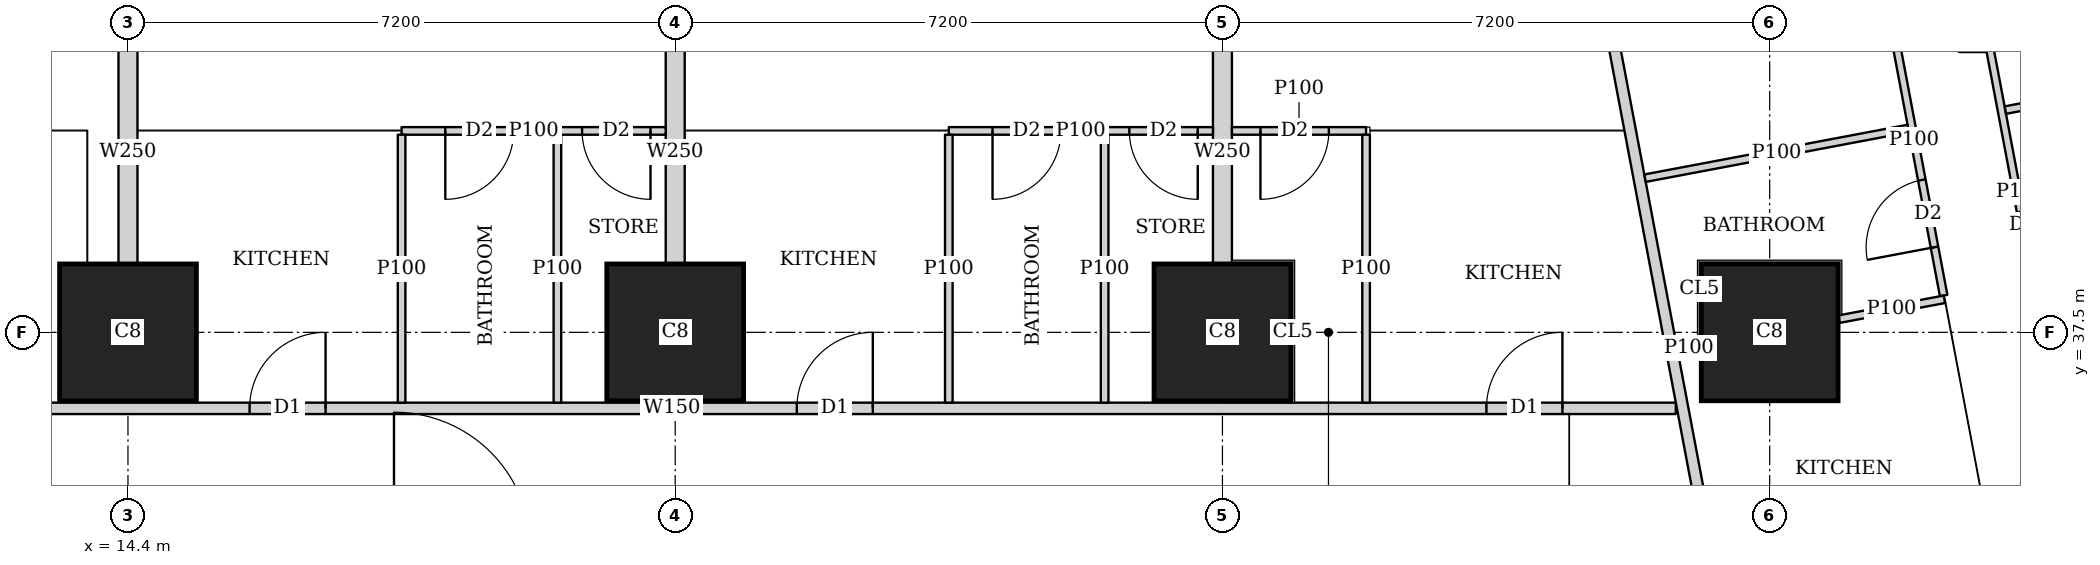
"""IFC4 building model, lengths in metres.
Left out: names, types, materials, properties, quantities, classifications, styles, units other than length and angle.
Written with IfcOpenShell. Run it as: python <this file> out.ifc"""

import sys

from ifc_helpers import new_model, si_unit, direction, frame, frame_2d, origin, origin_2d, place, context, subcontext, project, spatial, rectangle, extrude, element, fill, save


model = new_model("IFC4")
c1 = context("Model", 3, precision=1e-05, world=origin(), true_north=direction((0.0, 1.0)))
c2 = subcontext(c1, "Body", "Model", "MODEL_VIEW")
j1 = project(units=[si_unit("LENGTHUNIT", "METRE"), si_unit("PLANEANGLEUNIT", "RADIAN")], contexts=[c1])
p1 = place(None, origin())
s1 = spatial("IfcSite", under=j1, at=p1, CompositionType="ELEMENT")
p2 = place(p1, origin())
s2 = spatial("IfcBuilding", under=s1, at=p2, CompositionType="ELEMENT")
p3 = place(p2, frame((0.0, 0.0, 42.5)))
s3 = spatial("IfcBuildingStorey", under=s2, at=p3, CompositionType="ELEMENT", Elevation=42.5)
for number, where, z_axis, x_axis in (
    (1, (14.4, 37.5, 0.0), (0.0, 0.0, 1.0), (1.0, 0.0, 0.0)),
    (2, (21.6, 37.5, 0.0), (0.0, 0.0, 1.0), (1.0, 0.0, 0.0)),
    (3, (28.8, 37.5, 0.0), (0.0, 0.0, 1.0), (1.0, 0.0, 0.0)),
    (4, (36.0, 37.5, 0.0), (0.0, 0.0, 1.0), (1.0, 0.0, 0.0)),
):
    element("IfcColumn", number, at=place(p3, frame(where, z_axis=z_axis, x_axis=x_axis)), inside=s3, PredefinedType="COLUMN", context=c2, shape_type="SweptSolid", body=[
        extrude(rectangle(XDim=1.8, YDim=1.8, at=origin_2d()), origin(), (0.0, 0.0, 1.0), 3.75),
    ])
p4 = place(p3, frame((8.35, 36.5, 0.0), z_axis=(0.0, 0.0, 1.0), x_axis=(1.0, 0.0, 0.0)))
e5 = element("IfcWall", 5, at=p4, inside=s3, PredefinedType="SOLIDWALL", context=c2, shape_type="SweptSolid", body=[
    extrude(rectangle(XDim=26.415, YDim=0.15, at=frame_2d((13.208, 0.0))), origin(), (0.0, 0.0, 1.0), 3.5),
])
p5 = place(p4, frame((3.383, 0.0, 0.0)))
e6 = element("IfcOpeningElement", 6, at=p5, cuts=e5, PredefinedType="OPENING", context=c2, shape_type="SweptSolid", body=[
    extrude(rectangle(XDim=1.0, YDim=2.1, at=frame_2d((0.5, 1.05))), frame((0.0, 0.085, 0.0), z_axis=(0.0, -1.0, 0.0), x_axis=(1.0, 0.0, 0.0)), (0.0, 0.0, 1.0), 0.17),
])
p6 = place(p4, frame((7.65, 0.0, 0.0)))
e7 = element("IfcOpeningElement", 7, at=p6, cuts=e5, PredefinedType="OPENING", context=c2, shape_type="SweptSolid", body=[
    extrude(rectangle(XDim=1.0, YDim=2.1, at=frame_2d((0.5, 1.05))), frame((0.0, 0.085, 0.0), z_axis=(0.0, -1.0, 0.0), x_axis=(1.0, 0.0, 0.0)), (0.0, 0.0, 1.0), 0.17),
])
p7 = place(p4, frame((14.85, 0.0, 0.0)))
e8 = element("IfcOpeningElement", 8, at=p7, cuts=e5, PredefinedType="OPENING", context=c2, shape_type="SweptSolid", body=[
    extrude(rectangle(XDim=1.0, YDim=2.1, at=frame_2d((0.5, 1.05))), frame((0.0, 0.085, 0.0), z_axis=(0.0, -1.0, 0.0), x_axis=(1.0, 0.0, 0.0)), (0.0, 0.0, 1.0), 0.17),
])
p8 = place(p4, frame((23.923, 0.0, 0.0)))
e9 = element("IfcOpeningElement", 9, at=p8, cuts=e5, PredefinedType="OPENING", context=c2, shape_type="SweptSolid", body=[
    extrude(rectangle(XDim=1.0, YDim=2.1, at=frame_2d((0.5, 1.05))), frame((0.0, 0.085, 0.0), z_axis=(0.0, -1.0, 0.0), x_axis=(1.0, 0.0, 0.0)), (0.0, 0.0, 1.0), 0.17),
])
p9 = place(p3, frame((33.68, 42.723, 0.0), z_axis=(0.0, 0.0, 1.0), x_axis=(0.185624129307, -0.98262082342, 0.0)))
e10 = element("IfcWall", 10, at=p9, inside=s3, PredefinedType="SOLIDWALL", context=c2, shape_type="SweptSolid", body=[
    extrude(rectangle(XDim=41.051, YDim=0.15, at=frame_2d((20.526, 0.0))), origin(), (0.0, 0.0, 1.0), 2.5),
])
p10 = place(p9, frame((7.73, 0.0, 0.0)))
e11 = element("IfcOpeningElement", 11, at=p10, cuts=e10, PredefinedType="OPENING", context=c2, shape_type="SweptSolid", body=[
    extrude(rectangle(XDim=1.0, YDim=2.1, at=frame_2d((0.5, 1.05))), frame((0.0, 0.085, 0.0), z_axis=(0.0, -1.0, 0.0), x_axis=(1.0, 0.0, 0.0)), (0.0, 0.0, 1.0), 0.17),
])
p11 = place(p9, frame((12.307, 0.0, 0.0)))
e12 = element("IfcOpeningElement", 12, at=p11, cuts=e10, PredefinedType="OPENING", context=c2, shape_type="SweptSolid", body=[
    extrude(rectangle(XDim=1.0, YDim=2.1, at=frame_2d((0.5, 1.05))), frame((0.0, 0.085, 0.0), z_axis=(0.0, -1.0, 0.0), x_axis=(1.0, 0.0, 0.0)), (0.0, 0.0, 1.0), 0.17),
])
p12 = place(p9, frame((19.938, 0.0, 0.0)))
e13 = element("IfcOpeningElement", 13, at=p12, cuts=e10, PredefinedType="OPENING", context=c2, shape_type="SweptSolid", body=[
    extrude(rectangle(XDim=1.0, YDim=2.1, at=frame_2d((0.5, 1.05))), frame((0.0, 0.085, 0.0), z_axis=(0.0, -1.0, 0.0), x_axis=(1.0, 0.0, 0.0)), (0.0, 0.0, 1.0), 0.17),
])
p13 = place(p9, frame((32.193, 0.0, 0.0)))
e14 = element("IfcOpeningElement", 14, at=p13, cuts=e10, PredefinedType="OPENING", context=c2, shape_type="SweptSolid", body=[
    extrude(rectangle(XDim=1.0, YDim=2.1, at=frame_2d((0.5, 1.05))), frame((0.0, 0.085, 0.0), z_axis=(0.0, -1.0, 0.0), x_axis=(1.0, 0.0, 0.0)), (0.0, 0.0, 1.0), 0.17),
])
p14 = place(p3, frame((38.899, 41.22, 0.0), z_axis=(0.0, 0.0, 1.0), x_axis=(0.185517409072, -0.982640977637, 0.0)))
e15 = element("IfcWall", 15, at=p14, inside=s3, PredefinedType="PARTITIONING", context=c2, shape_type="SweptSolid", body=[
    extrude(rectangle(XDim=4.426, YDim=0.1, at=frame_2d((2.213, 0.0))), origin(), (0.0, 0.0, 1.0), 3.5),
])
p15 = place(p14, frame((1.9, 0.0, 0.0)))
e16 = element("IfcOpeningElement", 16, at=p15, cuts=e15, PredefinedType="OPENING", context=c2, shape_type="SweptSolid", body=[
    extrude(rectangle(XDim=0.9, YDim=2.1, at=frame_2d((0.45, 1.05))), frame((0.0, 0.06, 0.0), z_axis=(0.0, -1.0, 0.0), x_axis=(1.0, 0.0, 0.0)), (0.0, 0.0, 1.0), 0.12),
])
p16 = place(p3, frame((37.514, 42.089, 0.0), z_axis=(0.0, 0.0, 1.0), x_axis=(0.185540945282, -0.982636533833, 0.0)))
e17 = element("IfcWall", 17, at=p16, inside=s3, PredefinedType="PARTITIONING", context=c2, shape_type="SweptSolid", body=[
    extrude(rectangle(XDim=4.178, YDim=0.1, at=frame_2d((2.089, 0.0))), origin(), (0.0, 0.0, 1.0), 3.5),
])
p17 = place(p16, frame((2.63, 0.0, 0.0)))
e18 = element("IfcOpeningElement", 18, at=p17, cuts=e17, PredefinedType="OPENING", context=c2, shape_type="SweptSolid", body=[
    extrude(rectangle(XDim=0.9, YDim=2.1, at=frame_2d((0.45, 1.05))), frame((0.0, 0.06, 0.0), z_axis=(0.0, -1.0, 0.0), x_axis=(1.0, 0.0, 0.0)), (0.0, 0.0, 1.0), 0.12),
])
p18 = place(p3, frame((43.277, 41.212, 0.0), z_axis=(0.0, 0.0, 1.0), x_axis=(-0.982665405803, -0.185387972203, 0.0)))
e19 = element("IfcWall", 19, at=p18, inside=s3, PredefinedType="PARTITIONING", context=c2, shape_type="SweptSolid", body=[
    extrude(rectangle(XDim=4.25, YDim=0.1, at=frame_2d((2.125, 0.0))), origin(), (0.0, 0.0, 1.0), 2.05),
])
p19 = place(p3, frame((37.823, 40.182, 0.0), z_axis=(0.0, 0.0, 1.0), x_axis=(-0.98263926043, -0.185526504472, 0.0)))
e20 = element("IfcWall", 20, at=p19, inside=s3, PredefinedType="PARTITIONING", context=c2, shape_type="SweptSolid", body=[
    extrude(rectangle(XDim=3.524, YDim=0.1, at=frame_2d((1.762, 0.0))), origin(), (0.0, 0.0, 1.0), 3.5),
])
p20 = place(p3, frame((38.299, 37.935, 0.0), z_axis=(0.0, 0.0, 1.0), x_axis=(-0.982680053146, -0.185310315822, 0.0)))
e21 = element("IfcWall", 21, at=p20, inside=s3, PredefinedType="PARTITIONING", context=c2, shape_type="SweptSolid", body=[
    extrude(rectangle(XDim=1.414, YDim=0.1, at=frame_2d((0.707, 0.0))), origin(), (0.0, 0.0, 1.0), 3.5),
])
p21 = place(p3, frame((35.09, 37.328, 0.0), z_axis=(0.0, 0.0, 1.0), x_axis=(-0.982961380226, -0.183812200315, 0.0)))
e22 = element("IfcWall", 22, at=p21, inside=s3, PredefinedType="PARTITIONING", context=c2, shape_type="SweptSolid", body=[
    extrude(rectangle(XDim=0.31, YDim=0.1, at=frame_2d((0.155, 0.0))), origin(), (0.0, 0.0, 1.0), 3.5),
])
p22 = place(p3, frame((18.0, 40.15, 0.0), z_axis=(0.0, 0.0, 1.0), x_axis=(1.0, 0.0, 0.0)))
e23 = element("IfcWall", 23, at=p22, inside=s3, PredefinedType="PARTITIONING", context=c2, shape_type="SweptSolid", body=[
    extrude(rectangle(XDim=3.475, YDim=0.1, at=frame_2d((1.738, 0.0))), origin(), (0.0, 0.0, 1.0), 3.5),
])
p23 = place(p22, frame((0.575, 0.0, 0.0)))
e24 = element("IfcOpeningElement", 24, at=p23, cuts=e23, PredefinedType="OPENING", context=c2, shape_type="SweptSolid", body=[
    extrude(rectangle(XDim=0.9, YDim=2.1, at=frame_2d((0.45, 1.05))), frame((0.0, 0.06, 0.0), z_axis=(0.0, -1.0, 0.0), x_axis=(1.0, 0.0, 0.0)), (0.0, 0.0, 1.0), 0.12),
])
p24 = place(p22, frame((2.375, 0.0, 0.0)))
e25 = element("IfcOpeningElement", 25, at=p24, cuts=e23, PredefinedType="OPENING", context=c2, shape_type="SweptSolid", body=[
    extrude(rectangle(XDim=0.9, YDim=2.1, at=frame_2d((0.45, 1.05))), frame((0.0, 0.06, 0.0), z_axis=(0.0, -1.0, 0.0), x_axis=(1.0, 0.0, 0.0)), (0.0, 0.0, 1.0), 0.12),
])
for number, where, z_axis, x_axis in (
    (26, (18.0, 36.575, 0.0), (0.0, 0.0, 1.0), (0.0, 1.0, 0.0)),
    (27, (20.05, 36.575, 0.0), (0.0, 0.0, 1.0), (0.0, 1.0, 0.0)),
):
    element("IfcWall", number, at=place(p3, frame(where, z_axis=z_axis, x_axis=x_axis)), inside=s3, PredefinedType="PARTITIONING", context=c2, shape_type="SweptSolid", body=[
        extrude(rectangle(XDim=3.525, YDim=0.1, at=frame_2d((1.763, 0.0))), origin(), (0.0, 0.0, 1.0), 3.5),
    ])
p25 = place(p3, frame((14.4, 38.401, 0.0), z_axis=(0.0, 0.0, 1.0), x_axis=(0.0, 1.0, 0.0)))
e28 = element("IfcWall", 28, at=p25, inside=s3, PredefinedType="SOLIDWALL", context=c2, shape_type="SweptSolid", body=[
    extrude(rectangle(XDim=2.949, YDim=0.25, at=frame_2d((1.475, 0.0))), origin(), (0.0, 0.0, 1.0), 3.5),
])
p26 = place(p3, frame((25.2, 40.15, 0.0), z_axis=(0.0, 0.0, 1.0), x_axis=(1.0, 0.0, 0.0)))
e29 = element("IfcWall", 29, at=p26, inside=s3, PredefinedType="PARTITIONING", context=c2, shape_type="SweptSolid", body=[
    extrude(rectangle(XDim=3.475, YDim=0.1, at=frame_2d((1.738, 0.0))), origin(), (0.0, 0.0, 1.0), 3.5),
])
p27 = place(p26, frame((0.575, 0.0, 0.0)))
e30 = element("IfcOpeningElement", 30, at=p27, cuts=e29, PredefinedType="OPENING", context=c2, shape_type="SweptSolid", body=[
    extrude(rectangle(XDim=0.9, YDim=2.1, at=frame_2d((0.45, 1.05))), frame((0.0, 0.06, 0.0), z_axis=(0.0, -1.0, 0.0), x_axis=(1.0, 0.0, 0.0)), (0.0, 0.0, 1.0), 0.12),
])
p28 = place(p26, frame((2.375, 0.0, 0.0)))
e31 = element("IfcOpeningElement", 31, at=p28, cuts=e29, PredefinedType="OPENING", context=c2, shape_type="SweptSolid", body=[
    extrude(rectangle(XDim=0.9, YDim=2.1, at=frame_2d((0.45, 1.05))), frame((0.0, 0.06, 0.0), z_axis=(0.0, -1.0, 0.0), x_axis=(1.0, 0.0, 0.0)), (0.0, 0.0, 1.0), 0.12),
])
for number, where, z_axis, x_axis in (
    (32, (25.2, 36.575, 0.0), (0.0, 0.0, 1.0), (0.0, 1.0, 0.0)),
    (33, (27.25, 36.575, 0.0), (0.0, 0.0, 1.0), (0.0, 1.0, 0.0)),
):
    element("IfcWall", number, at=place(p3, frame(where, z_axis=z_axis, x_axis=x_axis)), inside=s3, PredefinedType="PARTITIONING", context=c2, shape_type="SweptSolid", body=[
        extrude(rectangle(XDim=3.525, YDim=0.1, at=frame_2d((1.763, 0.0))), origin(), (0.0, 0.0, 1.0), 3.5),
    ])
p29 = place(p3, frame((21.6, 38.401, 0.0), z_axis=(0.0, 0.0, 1.0), x_axis=(0.0, 1.0, 0.0)))
e34 = element("IfcWall", 34, at=p29, inside=s3, PredefinedType="SOLIDWALL", context=c2, shape_type="SweptSolid", body=[
    extrude(rectangle(XDim=2.949, YDim=0.25, at=frame_2d((1.475, 0.0))), origin(), (0.0, 0.0, 1.0), 3.5),
])
p30 = place(p3, frame((28.925, 40.15, 0.0), z_axis=(0.0, 0.0, 1.0), x_axis=(1.0, 0.0, 0.0)))
e35 = element("IfcWall", 35, at=p30, inside=s3, PredefinedType="PARTITIONING", context=c2, shape_type="SweptSolid", body=[
    extrude(rectangle(XDim=1.765, YDim=0.1, at=frame_2d((0.882, 0.0))), origin(), (0.0, 0.0, 1.0), 3.5),
])
p31 = place(p30, frame((0.375, 0.0, 0.0)))
e36 = element("IfcOpeningElement", 36, at=p31, cuts=e35, PredefinedType="OPENING", context=c2, shape_type="SweptSolid", body=[
    extrude(rectangle(XDim=0.9, YDim=2.1, at=frame_2d((0.45, 1.05))), frame((0.0, 0.06, 0.0), z_axis=(0.0, -1.0, 0.0), x_axis=(1.0, 0.0, 0.0)), (0.0, 0.0, 1.0), 0.12),
])
p32 = place(p3, frame((30.69, 36.575, 0.0), z_axis=(0.0, 0.0, 1.0), x_axis=(0.0, 1.0, 0.0)))
e37 = element("IfcWall", 37, at=p32, inside=s3, PredefinedType="PARTITIONING", context=c2, shape_type="SweptSolid", body=[
    extrude(rectangle(XDim=3.525, YDim=0.1, at=frame_2d((1.763, 0.0))), origin(), (0.0, 0.0, 1.0), 3.5),
])
p33 = place(p3, frame((28.8, 38.401, 0.0), z_axis=(0.0, 0.0, 1.0), x_axis=(0.0, 1.0, 0.0)))
e38 = element("IfcWall", 38, at=p33, inside=s3, PredefinedType="SOLIDWALL", context=c2, shape_type="SweptSolid", body=[
    extrude(rectangle(XDim=2.949, YDim=0.25, at=frame_2d((1.475, 0.0))), origin(), (0.0, 0.0, 1.0), 3.5),
])
p34 = place(p15, origin())
e39 = element("IfcDoor", 39, at=p34, inside=s3, OperationType="SINGLE_SWING_LEFT", PredefinedType="DOOR", context=c2, shape_type="SweptSolid", body=[
    extrude(rectangle(XDim=0.9, YDim=2.1, at=frame_2d((0.45, 1.05))), frame((0.0, 0.025, 0.0), z_axis=(0.0, -1.0, 0.0), x_axis=(1.0, 0.0, 0.0)), (0.0, 0.0, 1.0), 0.05),
])
fill(e16, e39)
p35 = place(p17, origin())
e40 = element("IfcDoor", 40, at=p35, inside=s3, OperationType="SINGLE_SWING_LEFT", PredefinedType="DOOR", context=c2, shape_type="SweptSolid", body=[
    extrude(rectangle(XDim=0.9, YDim=2.1, at=frame_2d((0.45, 1.05))), frame((0.0, 0.025, 0.0), z_axis=(0.0, -1.0, 0.0), x_axis=(1.0, 0.0, 0.0)), (0.0, 0.0, 1.0), 0.05),
])
fill(e18, e40)
p36 = place(p23, origin())
e41 = element("IfcDoor", 41, at=p36, inside=s3, OperationType="SINGLE_SWING_RIGHT", PredefinedType="DOOR", context=c2, shape_type="SweptSolid", body=[
    extrude(rectangle(XDim=0.9, YDim=2.1, at=frame_2d((0.45, 1.05))), frame((0.0, 0.025, 0.0), z_axis=(0.0, -1.0, 0.0), x_axis=(1.0, 0.0, 0.0)), (0.0, 0.0, 1.0), 0.05),
])
fill(e24, e41)
p37 = place(p24, origin())
e42 = element("IfcDoor", 42, at=p37, inside=s3, OperationType="SINGLE_SWING_LEFT", PredefinedType="DOOR", context=c2, shape_type="SweptSolid", body=[
    extrude(rectangle(XDim=0.9, YDim=2.1, at=frame_2d((0.45, 1.05))), frame((0.0, 0.025, 0.0), z_axis=(0.0, -1.0, 0.0), x_axis=(1.0, 0.0, 0.0)), (0.0, 0.0, 1.0), 0.05),
])
fill(e25, e42)
p38 = place(p6, origin())
e43 = element("IfcDoor", 43, at=p38, inside=s3, OperationType="SINGLE_SWING_RIGHT", PredefinedType="DOOR", context=c2, shape_type="SweptSolid", body=[
    extrude(rectangle(XDim=1.0, YDim=2.1, at=frame_2d((0.5, 1.05))), frame((0.0, 0.025, 0.0), z_axis=(0.0, -1.0, 0.0), x_axis=(1.0, 0.0, 0.0)), (0.0, 0.0, 1.0), 0.05),
])
fill(e7, e43)
p39 = place(p27, origin())
e44 = element("IfcDoor", 44, at=p39, inside=s3, OperationType="SINGLE_SWING_RIGHT", PredefinedType="DOOR", context=c2, shape_type="SweptSolid", body=[
    extrude(rectangle(XDim=0.9, YDim=2.1, at=frame_2d((0.45, 1.05))), frame((0.0, 0.025, 0.0), z_axis=(0.0, -1.0, 0.0), x_axis=(1.0, 0.0, 0.0)), (0.0, 0.0, 1.0), 0.05),
])
fill(e30, e44)
p40 = place(p28, origin())
e45 = element("IfcDoor", 45, at=p40, inside=s3, OperationType="SINGLE_SWING_LEFT", PredefinedType="DOOR", context=c2, shape_type="SweptSolid", body=[
    extrude(rectangle(XDim=0.9, YDim=2.1, at=frame_2d((0.45, 1.05))), frame((0.0, 0.025, 0.0), z_axis=(0.0, -1.0, 0.0), x_axis=(1.0, 0.0, 0.0)), (0.0, 0.0, 1.0), 0.05),
])
fill(e31, e45)
p41 = place(p7, origin())
e46 = element("IfcDoor", 46, at=p41, inside=s3, OperationType="SINGLE_SWING_RIGHT", PredefinedType="DOOR", context=c2, shape_type="SweptSolid", body=[
    extrude(rectangle(XDim=1.0, YDim=2.1, at=frame_2d((0.5, 1.05))), frame((0.0, 0.025, 0.0), z_axis=(0.0, -1.0, 0.0), x_axis=(1.0, 0.0, 0.0)), (0.0, 0.0, 1.0), 0.05),
])
fill(e8, e46)
p42 = place(p31, origin())
e47 = element("IfcDoor", 47, at=p42, inside=s3, OperationType="SINGLE_SWING_RIGHT", PredefinedType="DOOR", context=c2, shape_type="SweptSolid", body=[
    extrude(rectangle(XDim=0.9, YDim=2.1, at=frame_2d((0.45, 1.05))), frame((0.0, 0.025, 0.0), z_axis=(0.0, -1.0, 0.0), x_axis=(1.0, 0.0, 0.0)), (0.0, 0.0, 1.0), 0.05),
])
fill(e36, e47)
p43 = place(p8, origin())
e48 = element("IfcDoor", 48, at=p43, inside=s3, OperationType="SINGLE_SWING_RIGHT", PredefinedType="DOOR", context=c2, shape_type="SweptSolid", body=[
    extrude(rectangle(XDim=1.0, YDim=2.1, at=frame_2d((0.5, 1.05))), frame((0.0, 0.025, 0.0), z_axis=(0.0, -1.0, 0.0), x_axis=(1.0, 0.0, 0.0)), (0.0, 0.0, 1.0), 0.05),
])
fill(e9, e48)
save(model, sys.argv[1])
